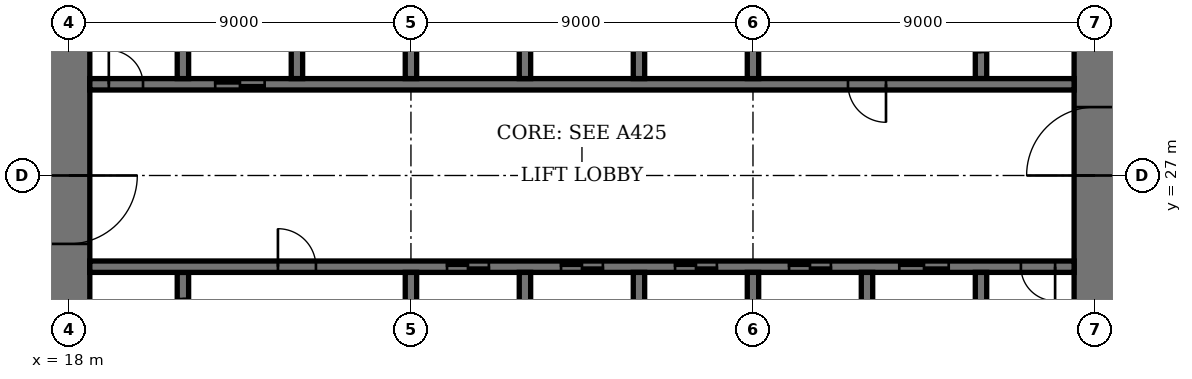
"""IFC4 building model, lengths in metres.
Left out: names, types, materials, properties, quantities, classifications, styles, units other than length and angle.
Written with IfcOpenShell. Run it as: python <this file> out.ifc"""

import sys

from ifc_helpers import new_model, si_unit, direction, frame, frame_2d, origin, place, context, subcontext, project, spatial, rectangle, extrude, element, fill, save


model = new_model("IFC4")
c1 = context("Model", 3, precision=1e-05, world=origin(), true_north=direction((0.0, 1.0)))
c2 = subcontext(c1, "Body", "Model", "MODEL_VIEW")
j1 = project(units=[si_unit("LENGTHUNIT", "METRE"), si_unit("PLANEANGLEUNIT", "RADIAN")], contexts=[c1])
p1 = place(None, origin())
s1 = spatial("IfcSite", under=j1, at=p1, CompositionType="ELEMENT")
p2 = place(p1, origin())
s2 = spatial("IfcBuilding", under=s1, at=p2, CompositionType="ELEMENT")
p3 = place(p2, frame((0.0, 0.0, 63.8)))
s3 = spatial("IfcBuildingStorey", under=s2, at=p3, CompositionType="ELEMENT", Elevation=63.8)
p4 = place(p3, frame((18.0, 35.45, 0.0), z_axis=(0.0, 0.0, 1.0), x_axis=(0.0, -1.0, 0.0)))
e1 = element("IfcWall", 1, at=p4, inside=s3, PredefinedType="SHEAR", context=c2, shape_type="SweptSolid", body=[
    extrude(rectangle(XDim=16.9, YDim=1.1, at=frame_2d((8.45, 0.0))), origin(), (0.0, 0.0, 1.0), 4.0),
])
p5 = place(p4, frame((8.45, 0.0, 0.0)))
e2 = element("IfcOpeningElement", 2, at=p5, cuts=e1, PredefinedType="OPENING", context=c2, shape_type="SweptSolid", body=[
    extrude(rectangle(XDim=1.8, YDim=2.4, at=frame_2d((0.9, 1.2))), frame((0.0, 0.56, 0.0), z_axis=(0.0, -1.0, 0.0), x_axis=(1.0, 0.0, 0.0)), (0.0, 0.0, 1.0), 1.12),
])
p6 = place(p3, frame((45.0, 18.55, 0.0), z_axis=(0.0, 0.0, 1.0), x_axis=(0.0, 1.0, 0.0)))
e3 = element("IfcWall", 3, at=p6, inside=s3, PredefinedType="SHEAR", context=c2, shape_type="SweptSolid", body=[
    extrude(rectangle(XDim=16.9, YDim=1.1, at=frame_2d((8.45, 0.0))), origin(), (0.0, 0.0, 1.0), 4.0),
])
p7 = place(p6, frame((8.45, 0.0, 0.0)))
e4 = element("IfcOpeningElement", 4, at=p7, cuts=e3, PredefinedType="OPENING", context=c2, shape_type="SweptSolid", body=[
    extrude(rectangle(XDim=1.8, YDim=2.4, at=frame_2d((0.9, 1.2))), frame((0.0, 0.56, 0.0), z_axis=(0.0, -1.0, 0.0), x_axis=(1.0, 0.0, 0.0)), (0.0, 0.0, 1.0), 1.12),
])
p8 = place(p3, frame((21.0, 21.95, 0.0), z_axis=(0.0, 0.0, 1.0), x_axis=(0.0, 1.0, 0.0)))
e5 = element("IfcWall", 5, at=p8, inside=s3, PredefinedType="SHEAR", context=c2, shape_type="SweptSolid", body=[
    extrude(rectangle(XDim=2.5, YDim=0.3, at=frame_2d((1.25, 0.0))), origin(), (0.0, 0.0, 1.0), 4.0),
])
p9 = place(p8, frame((0.7, 0.0, 0.0)))
e6 = element("IfcOpeningElement", 6, at=p9, cuts=e5, PredefinedType="OPENING", context=c2, shape_type="SweptSolid", body=[
    extrude(rectangle(XDim=1.1, YDim=2.4, at=frame_2d((0.55, 1.2))), frame((0.0, 0.16, 0.0), z_axis=(0.0, -1.0, 0.0), x_axis=(1.0, 0.0, 0.0)), (0.0, 0.0, 1.0), 0.32),
])
p10 = place(p3, frame((42.0, 29.55, 0.0), z_axis=(0.0, 0.0, 1.0), x_axis=(0.0, 1.0, 0.0)))
e7 = element("IfcWall", 7, at=p10, inside=s3, PredefinedType="SHEAR", context=c2, shape_type="SweptSolid", body=[
    extrude(rectangle(XDim=2.5, YDim=0.3, at=frame_2d((1.25, 0.0))), origin(), (0.0, 0.0, 1.0), 4.0),
])
p11 = place(p10, frame((0.7, 0.0, 0.0)))
e8 = element("IfcOpeningElement", 8, at=p11, cuts=e7, PredefinedType="OPENING", context=c2, shape_type="SweptSolid", body=[
    extrude(rectangle(XDim=1.1, YDim=2.4, at=frame_2d((0.55, 1.2))), frame((0.0, 0.16, 0.0), z_axis=(0.0, -1.0, 0.0), x_axis=(1.0, 0.0, 0.0)), (0.0, 0.0, 1.0), 0.32),
])
p12 = place(p3, frame((18.55, 24.6, 0.0), z_axis=(0.0, 0.0, 1.0), x_axis=(1.0, 0.0, 0.0)))
e9 = element("IfcWall", 9, at=p12, inside=s3, PredefinedType="SHEAR", context=c2, shape_type="SweptSolid", body=[
    extrude(rectangle(XDim=25.9, YDim=0.3, at=frame_2d((12.95, 0.0))), origin(), (0.0, 0.0, 1.0), 4.0),
])
p13 = place(p12, frame((4.95, 0.0, 0.0)))
e10 = element("IfcOpeningElement", 10, at=p13, cuts=e9, PredefinedType="OPENING", context=c2, shape_type="SweptSolid", body=[
    extrude(rectangle(XDim=1.0, YDim=2.4, at=frame_2d((0.5, 1.2))), frame((0.0, 0.16, 0.0), z_axis=(0.0, -1.0, 0.0), x_axis=(1.0, 0.0, 0.0)), (0.0, 0.0, 1.0), 0.32),
])
p14 = place(p12, frame((24.5, 0.0, 0.0)))
e11 = element("IfcOpeningElement", 11, at=p14, cuts=e9, PredefinedType="OPENING", context=c2, shape_type="SweptSolid", body=[
    extrude(rectangle(XDim=0.9, YDim=2.1, at=frame_2d((0.45, 1.05))), frame((0.0, 0.16, 0.0), z_axis=(0.0, -1.0, 0.0), x_axis=(1.0, 0.0, 0.0)), (0.0, 0.0, 1.0), 0.32),
])
p15 = place(p12, frame((9.4, 0.0, 0.0)))
e12 = element("IfcOpeningElement", 12, at=p15, cuts=e9, PredefinedType="OPENING", context=c2, shape_type="SweptSolid", body=[
    extrude(rectangle(XDim=1.1, YDim=2.4, at=frame_2d((0.55, 1.2))), frame((0.0, 0.16, 0.0), z_axis=(0.0, -1.0, 0.0), x_axis=(1.0, 0.0, 0.0)), (0.0, 0.0, 1.0), 0.32),
])
p16 = place(p12, frame((12.4, 0.0, 0.0)))
e13 = element("IfcOpeningElement", 13, at=p16, cuts=e9, PredefinedType="OPENING", context=c2, shape_type="SweptSolid", body=[
    extrude(rectangle(XDim=1.1, YDim=2.4, at=frame_2d((0.55, 1.2))), frame((0.0, 0.16, 0.0), z_axis=(0.0, -1.0, 0.0), x_axis=(1.0, 0.0, 0.0)), (0.0, 0.0, 1.0), 0.32),
])
p17 = place(p12, frame((15.4, 0.0, 0.0)))
e14 = element("IfcOpeningElement", 14, at=p17, cuts=e9, PredefinedType="OPENING", context=c2, shape_type="SweptSolid", body=[
    extrude(rectangle(XDim=1.1, YDim=2.4, at=frame_2d((0.55, 1.2))), frame((0.0, 0.16, 0.0), z_axis=(0.0, -1.0, 0.0), x_axis=(1.0, 0.0, 0.0)), (0.0, 0.0, 1.0), 0.32),
])
p18 = place(p12, frame((18.4, 0.0, 0.0)))
e15 = element("IfcOpeningElement", 15, at=p18, cuts=e9, PredefinedType="OPENING", context=c2, shape_type="SweptSolid", body=[
    extrude(rectangle(XDim=1.1, YDim=2.4, at=frame_2d((0.55, 1.2))), frame((0.0, 0.16, 0.0), z_axis=(0.0, -1.0, 0.0), x_axis=(1.0, 0.0, 0.0)), (0.0, 0.0, 1.0), 0.32),
])
p19 = place(p12, frame((21.3, 0.0, 0.0)))
e16 = element("IfcOpeningElement", 16, at=p19, cuts=e9, PredefinedType="OPENING", context=c2, shape_type="SweptSolid", body=[
    extrude(rectangle(XDim=1.3, YDim=2.4, at=frame_2d((0.65, 1.2))), frame((0.0, 0.16, 0.0), z_axis=(0.0, -1.0, 0.0), x_axis=(1.0, 0.0, 0.0)), (0.0, 0.0, 1.0), 0.32),
])
p20 = place(p3, frame((18.55, 29.4, 0.0), z_axis=(0.0, 0.0, 1.0), x_axis=(1.0, 0.0, 0.0)))
e17 = element("IfcWall", 17, at=p20, inside=s3, PredefinedType="SHEAR", context=c2, shape_type="SweptSolid", body=[
    extrude(rectangle(XDim=25.9, YDim=0.3, at=frame_2d((12.95, 0.0))), origin(), (0.0, 0.0, 1.0), 4.0),
])
p21 = place(p20, frame((19.95, 0.0, 0.0)))
e18 = element("IfcOpeningElement", 18, at=p21, cuts=e17, PredefinedType="OPENING", context=c2, shape_type="SweptSolid", body=[
    extrude(rectangle(XDim=1.0, YDim=2.4, at=frame_2d((0.5, 1.2))), frame((0.0, 0.16, 0.0), z_axis=(0.0, -1.0, 0.0), x_axis=(1.0, 0.0, 0.0)), (0.0, 0.0, 1.0), 0.32),
])
p22 = place(p20, frame((0.5, 0.0, 0.0)))
e19 = element("IfcOpeningElement", 19, at=p22, cuts=e17, PredefinedType="OPENING", context=c2, shape_type="SweptSolid", body=[
    extrude(rectangle(XDim=0.9, YDim=2.1, at=frame_2d((0.45, 1.05))), frame((0.0, 0.16, 0.0), z_axis=(0.0, -1.0, 0.0), x_axis=(1.0, 0.0, 0.0)), (0.0, 0.0, 1.0), 0.32),
])
p23 = place(p20, frame((3.3, 0.0, 0.0)))
e20 = element("IfcOpeningElement", 20, at=p23, cuts=e17, PredefinedType="OPENING", context=c2, shape_type="SweptSolid", body=[
    extrude(rectangle(XDim=1.3, YDim=2.4, at=frame_2d((0.65, 1.2))), frame((0.0, 0.16, 0.0), z_axis=(0.0, -1.0, 0.0), x_axis=(1.0, 0.0, 0.0)), (0.0, 0.0, 1.0), 0.32),
])
for number, where, z_axis, x_axis in (
    (21, (30.0, 21.75, 0.0), (0.0, 0.0, 1.0), (0.0, 1.0, 0.0)),
    (22, (33.0, 29.55, 0.0), (0.0, 0.0, 1.0), (0.0, 1.0, 0.0)),
    (23, (33.0, 21.75, 0.0), (0.0, 0.0, 1.0), (0.0, 1.0, 0.0)),
    (24, (30.0, 29.55, 0.0), (0.0, 0.0, 1.0), (0.0, 1.0, 0.0)),
    (25, (36.0, 21.75, 0.0), (0.0, 0.0, 1.0), (0.0, 1.0, 0.0)),
    (26, (27.0, 29.55, 0.0), (0.0, 0.0, 1.0), (0.0, 1.0, 0.0)),
):
    element("IfcWall", number, at=place(p3, frame(where, z_axis=z_axis, x_axis=x_axis)), inside=s3, PredefinedType="SHEAR", context=c2, shape_type="SweptSolid", body=[
        extrude(rectangle(XDim=2.7, YDim=0.3, at=frame_2d((1.35, 0.0))), origin(), (0.0, 0.0, 1.0), 4.0),
    ])
for number, where, z_axis, x_axis in (
    (27, (39.0, 18.55, 0.0), (0.0, 0.0, 1.0), (0.0, 1.0, 0.0)),
    (28, (24.0, 29.55, 0.0), (0.0, 0.0, 1.0), (0.0, 1.0, 0.0)),
):
    element("IfcWall", number, at=place(p3, frame(where, z_axis=z_axis, x_axis=x_axis)), inside=s3, PredefinedType="SHEAR", context=c2, shape_type="SweptSolid", body=[
        extrude(rectangle(XDim=5.9, YDim=0.3, at=frame_2d((2.95, 0.0))), origin(), (0.0, 0.0, 1.0), 4.0),
    ])
for number, where, z_axis, x_axis in (
    (29, (42.0, 21.75, 0.0), (0.0, 0.0, 1.0), (0.0, 1.0, 0.0)),
    (30, (21.0, 29.55, 0.0), (0.0, 0.0, 1.0), (0.0, 1.0, 0.0)),
):
    element("IfcWall", number, at=place(p3, frame(where, z_axis=z_axis, x_axis=x_axis)), inside=s3, PredefinedType="SHEAR", context=c2, shape_type="SweptSolid", body=[
        extrude(rectangle(XDim=2.7, YDim=0.3, at=frame_2d((1.35, 0.0))), origin(), (0.0, 0.0, 1.0), 4.0),
    ])
for number, where, z_axis, x_axis in (
    (31, (27.0, 21.6, 0.0), (0.0, 0.0, 1.0), (0.0, 1.0, 0.0)),
    (32, (36.0, 29.55, 0.0), (0.0, 0.0, 1.0), (0.0, 1.0, 0.0)),
):
    element("IfcWall", number, at=place(p3, frame(where, z_axis=z_axis, x_axis=x_axis)), inside=s3, PredefinedType="SHEAR", context=c2, shape_type="SweptSolid", body=[
        extrude(rectangle(XDim=2.85, YDim=0.3, at=frame_2d((1.425, 0.0))), origin(), (0.0, 0.0, 1.0), 4.0),
    ])
p24 = place(p5, origin())
e33 = element("IfcDoor", 33, at=p24, inside=s3, OperationType="DOUBLE_DOOR_DOUBLE_SWING", PredefinedType="DOOR", context=c2, shape_type="SweptSolid", body=[
    extrude(rectangle(XDim=1.8, YDim=2.4, at=frame_2d((0.9, 1.2))), frame((0.0, 0.03, 0.0), z_axis=(0.0, -1.0, 0.0), x_axis=(1.0, 0.0, 0.0)), (0.0, 0.0, 1.0), 0.06),
    extrude(rectangle(XDim=0.04, YDim=2.4, at=frame_2d((0.02, 1.2))), frame((0.0, 0.55, 0.0), z_axis=(0.0, -1.0, 0.0), x_axis=(1.0, 0.0, 0.0)), (0.0, 0.0, 1.0), 1.1),
    extrude(rectangle(XDim=0.04, YDim=2.4, at=frame_2d((1.78, 1.2))), frame((0.0, 0.55, 0.0), z_axis=(0.0, -1.0, 0.0), x_axis=(1.0, 0.0, 0.0)), (0.0, 0.0, 1.0), 1.1),
    extrude(rectangle(XDim=1.8, YDim=0.04, at=frame_2d((0.9, 2.38))), frame((0.0, 0.55, 0.0), z_axis=(0.0, -1.0, 0.0), x_axis=(1.0, 0.0, 0.0)), (0.0, 0.0, 1.0), 1.1),
])
fill(e2, e33)
p25 = place(p7, origin())
e34 = element("IfcDoor", 34, at=p25, inside=s3, OperationType="DOUBLE_DOOR_DOUBLE_SWING", PredefinedType="DOOR", context=c2, shape_type="SweptSolid", body=[
    extrude(rectangle(XDim=1.8, YDim=2.4, at=frame_2d((0.9, 1.2))), frame((0.0, 0.03, 0.0), z_axis=(0.0, -1.0, 0.0), x_axis=(1.0, 0.0, 0.0)), (0.0, 0.0, 1.0), 0.06),
    extrude(rectangle(XDim=0.04, YDim=2.4, at=frame_2d((0.02, 1.2))), frame((0.0, 0.55, 0.0), z_axis=(0.0, -1.0, 0.0), x_axis=(1.0, 0.0, 0.0)), (0.0, 0.0, 1.0), 1.1),
    extrude(rectangle(XDim=0.04, YDim=2.4, at=frame_2d((1.78, 1.2))), frame((0.0, 0.55, 0.0), z_axis=(0.0, -1.0, 0.0), x_axis=(1.0, 0.0, 0.0)), (0.0, 0.0, 1.0), 1.1),
    extrude(rectangle(XDim=1.8, YDim=0.04, at=frame_2d((0.9, 2.38))), frame((0.0, 0.55, 0.0), z_axis=(0.0, -1.0, 0.0), x_axis=(1.0, 0.0, 0.0)), (0.0, 0.0, 1.0), 1.1),
])
fill(e4, e34)
p26 = place(p13, origin())
e35 = element("IfcDoor", 35, at=p26, inside=s3, OperationType="SINGLE_SWING_RIGHT", PredefinedType="DOOR", context=c2, shape_type="SweptSolid", body=[
    extrude(rectangle(XDim=1.0, YDim=2.4, at=frame_2d((0.5, 1.2))), frame((0.0, 0.03, 0.0), z_axis=(0.0, -1.0, 0.0), x_axis=(1.0, 0.0, 0.0)), (0.0, 0.0, 1.0), 0.06),
])
fill(e10, e35)
p27 = place(p21, origin())
e36 = element("IfcDoor", 36, at=p27, inside=s3, OperationType="SINGLE_SWING_RIGHT", PredefinedType="DOOR", context=c2, shape_type="SweptSolid", body=[
    extrude(rectangle(XDim=1.0, YDim=2.4, at=frame_2d((0.5, 1.2))), frame((0.0, 0.03, 0.0), z_axis=(0.0, -1.0, 0.0), x_axis=(1.0, 0.0, 0.0)), (0.0, 0.0, 1.0), 0.06),
])
fill(e18, e36)
p28 = place(p14, origin())
e37 = element("IfcDoor", 37, at=p28, inside=s3, OperationType="SINGLE_SWING_RIGHT", PredefinedType="DOOR", context=c2, shape_type="SweptSolid", body=[
    extrude(rectangle(XDim=0.9, YDim=2.1, at=frame_2d((0.45, 1.05))), frame((0.0, 0.03, 0.0), z_axis=(0.0, -1.0, 0.0), x_axis=(1.0, 0.0, 0.0)), (0.0, 0.0, 1.0), 0.06),
])
fill(e11, e37)
p29 = place(p22, origin())
e38 = element("IfcDoor", 38, at=p29, inside=s3, OperationType="SINGLE_SWING_RIGHT", PredefinedType="DOOR", context=c2, shape_type="SweptSolid", body=[
    extrude(rectangle(XDim=0.9, YDim=2.1, at=frame_2d((0.45, 1.05))), frame((0.0, 0.03, 0.0), z_axis=(0.0, -1.0, 0.0), x_axis=(1.0, 0.0, 0.0)), (0.0, 0.0, 1.0), 0.06),
])
fill(e19, e38)
p30 = place(p15, origin())
e39 = element("IfcDoor", 39, at=p30, inside=s3, OperationType="DOUBLE_DOOR_SLIDING", PredefinedType="DOOR", context=c2, shape_type="SweptSolid", body=[
    extrude(rectangle(XDim=1.1, YDim=2.4, at=frame_2d((0.55, 1.2))), frame((0.0, 0.02, 0.0), z_axis=(0.0, -1.0, 0.0), x_axis=(1.0, 0.0, 0.0)), (0.0, 0.0, 1.0), 0.04),
])
fill(e12, e39)
p31 = place(p16, origin())
e40 = element("IfcDoor", 40, at=p31, inside=s3, OperationType="DOUBLE_DOOR_SLIDING", PredefinedType="DOOR", context=c2, shape_type="SweptSolid", body=[
    extrude(rectangle(XDim=1.1, YDim=2.4, at=frame_2d((0.55, 1.2))), frame((0.0, 0.02, 0.0), z_axis=(0.0, -1.0, 0.0), x_axis=(1.0, 0.0, 0.0)), (0.0, 0.0, 1.0), 0.04),
])
fill(e13, e40)
p32 = place(p17, origin())
e41 = element("IfcDoor", 41, at=p32, inside=s3, OperationType="DOUBLE_DOOR_SLIDING", PredefinedType="DOOR", context=c2, shape_type="SweptSolid", body=[
    extrude(rectangle(XDim=1.1, YDim=2.4, at=frame_2d((0.55, 1.2))), frame((0.0, 0.02, 0.0), z_axis=(0.0, -1.0, 0.0), x_axis=(1.0, 0.0, 0.0)), (0.0, 0.0, 1.0), 0.04),
])
fill(e14, e41)
p33 = place(p18, origin())
e42 = element("IfcDoor", 42, at=p33, inside=s3, OperationType="DOUBLE_DOOR_SLIDING", PredefinedType="DOOR", context=c2, shape_type="SweptSolid", body=[
    extrude(rectangle(XDim=1.1, YDim=2.4, at=frame_2d((0.55, 1.2))), frame((0.0, 0.02, 0.0), z_axis=(0.0, -1.0, 0.0), x_axis=(1.0, 0.0, 0.0)), (0.0, 0.0, 1.0), 0.04),
])
fill(e15, e42)
p34 = place(p19, origin())
e43 = element("IfcDoor", 43, at=p34, inside=s3, OperationType="DOUBLE_DOOR_SLIDING", PredefinedType="DOOR", context=c2, shape_type="SweptSolid", body=[
    extrude(rectangle(XDim=1.3, YDim=2.4, at=frame_2d((0.65, 1.2))), frame((0.0, 0.02, 0.0), z_axis=(0.0, -1.0, 0.0), x_axis=(1.0, 0.0, 0.0)), (0.0, 0.0, 1.0), 0.04),
])
fill(e16, e43)
p35 = place(p23, origin())
e44 = element("IfcDoor", 44, at=p35, inside=s3, OperationType="DOUBLE_DOOR_SLIDING", PredefinedType="DOOR", context=c2, shape_type="SweptSolid", body=[
    extrude(rectangle(XDim=1.3, YDim=2.4, at=frame_2d((0.65, 1.2))), frame((0.0, 0.02, 0.0), z_axis=(0.0, -1.0, 0.0), x_axis=(1.0, 0.0, 0.0)), (0.0, 0.0, 1.0), 0.04),
])
fill(e20, e44)
save(model, sys.argv[1])
